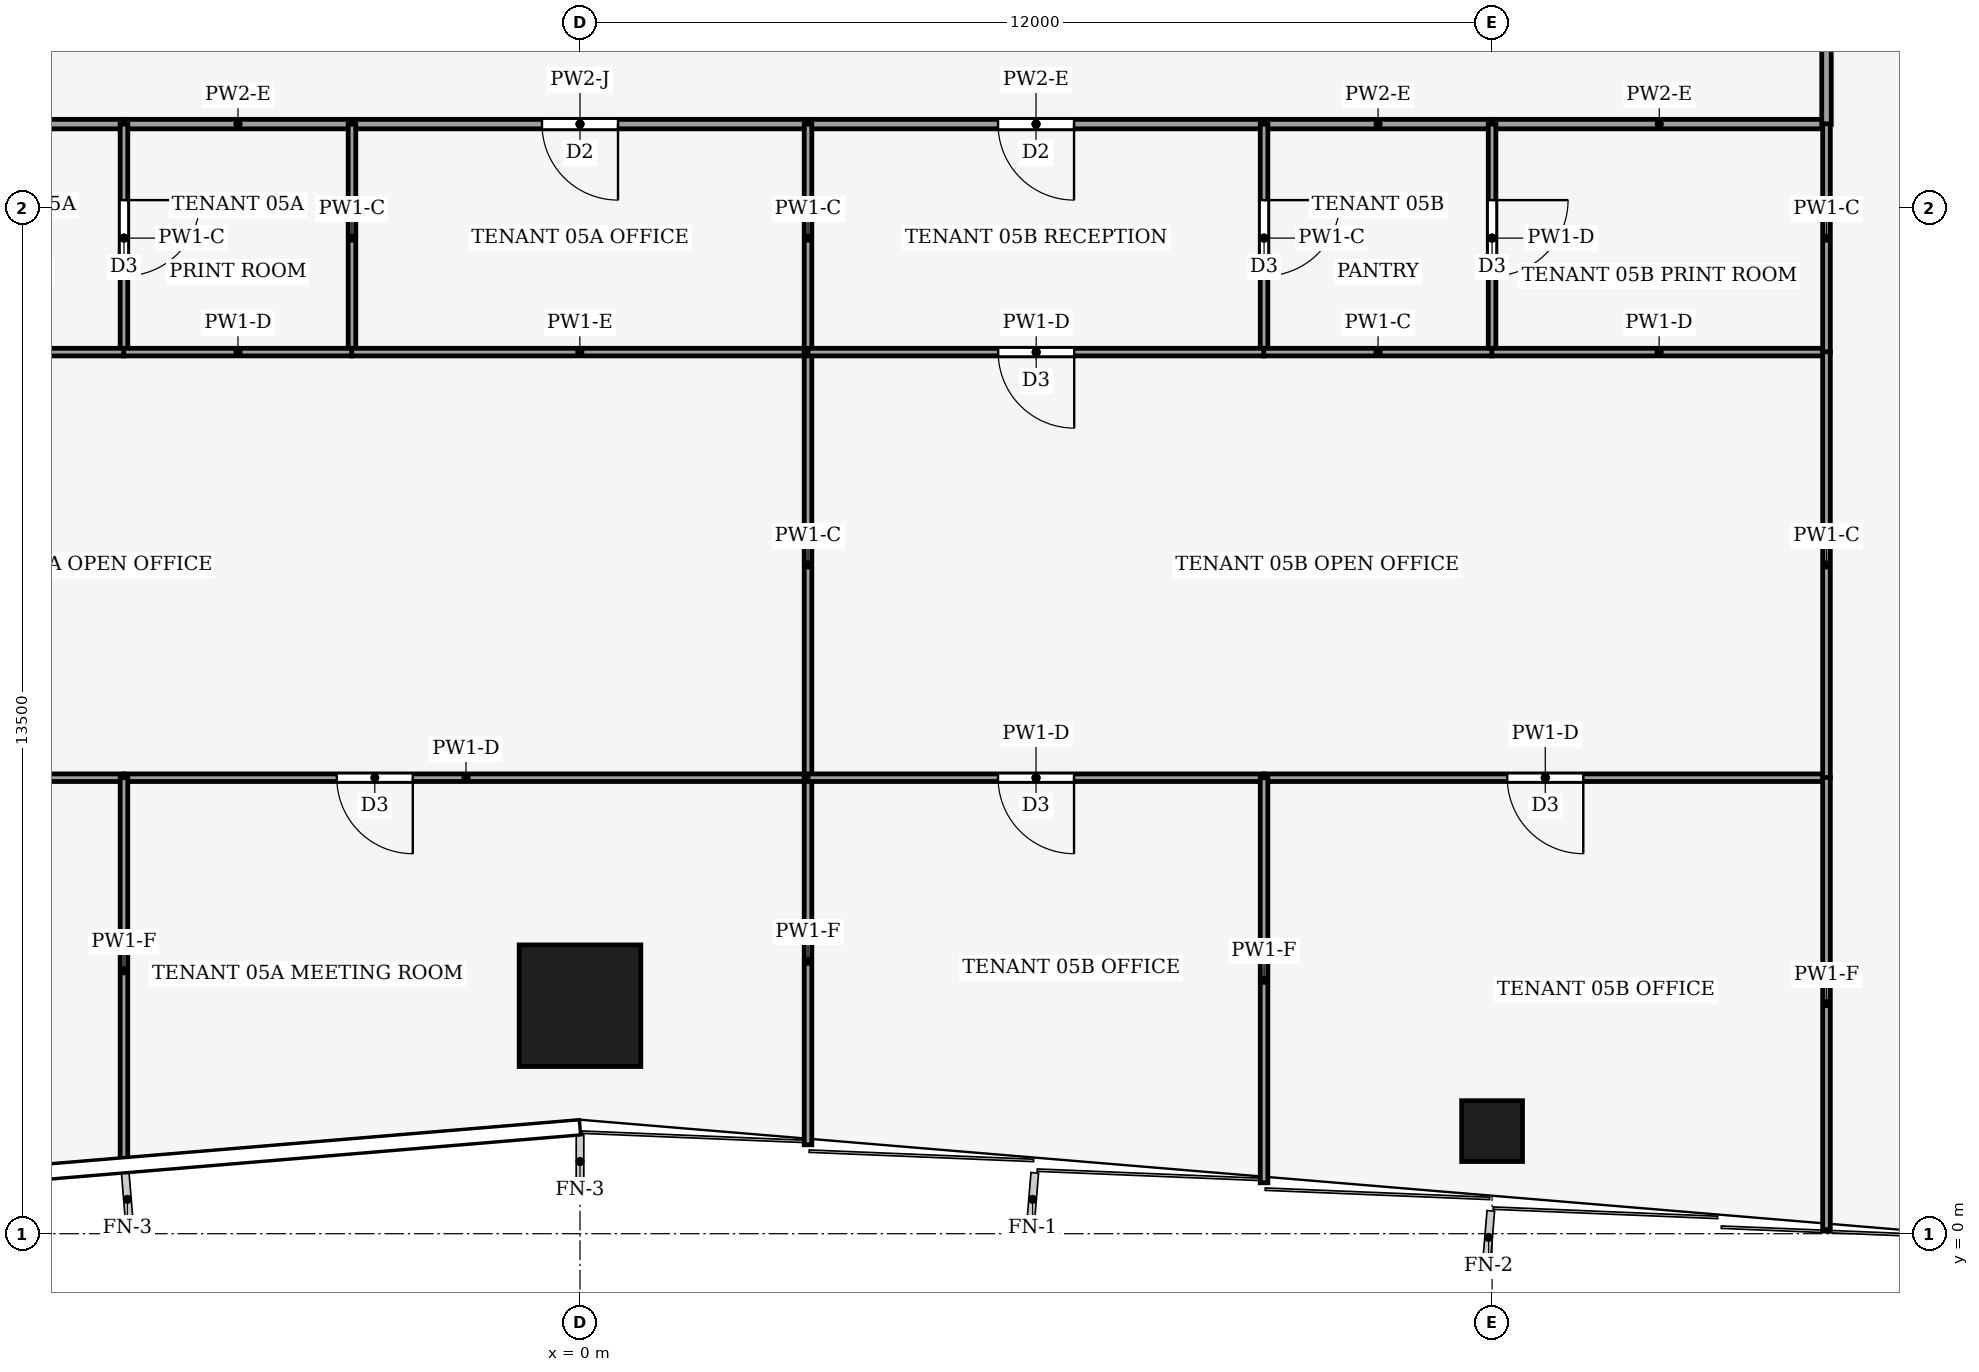
"""IFC4 building model, lengths in metres.
Left out: names, types, materials, properties, quantities, classifications, styles, units other than length and angle.
Written with IfcOpenShell. Run it as: python <this file> out.ifc"""

import sys

from ifc_helpers import new_model, si_unit, direction, frame, frame_2d, origin, origin_2d, place, context, subcontext, project, spatial, rectangle, hollow_rectangle, extrude, element, fill, save


model = new_model("IFC4")
c1 = context("Model", 3, precision=1e-05, world=origin(), true_north=direction((0.0, 1.0)))
c2 = subcontext(c1, "Body", "Model", "MODEL_VIEW")
j1 = project(units=[si_unit("LENGTHUNIT", "METRE"), si_unit("PLANEANGLEUNIT", "RADIAN")], contexts=[c1])
p1 = place(None, origin())
s1 = spatial("IfcSite", under=j1, at=p1, CompositionType="ELEMENT")
p2 = place(p1, origin())
s2 = spatial("IfcBuilding", under=s1, at=p2, CompositionType="ELEMENT")
p3 = place(p2, frame((0.0, 0.0, 26.0)))
s3 = spatial("IfcBuildingStorey", under=s2, at=p3, CompositionType="ELEMENT", Elevation=26.0)
p4 = place(p3, frame((0.0, 3.0, 0.0), z_axis=(0.0, 0.0, 1.0), x_axis=(1.0, 0.0, 0.0)))
e1 = element("IfcColumn", 1, at=p4, inside=s3, PredefinedType="COLUMN", context=c2, shape_type="SweptSolid", body=[
    extrude(hollow_rectangle(XDim=1.6, YDim=1.6, WallThickness=0.09, at=origin_2d()), origin(), (0.0, 0.0, 1.0), 4.0),
])
p5 = place(p3, frame((12.0, 1.35, 0.0), z_axis=(0.0, 0.0, 1.0), x_axis=(1.0, 0.0, 0.0)))
e2 = element("IfcColumn", 2, at=p5, inside=s3, PredefinedType="COLUMN", context=c2, shape_type="SweptSolid", body=[
    extrude(hollow_rectangle(XDim=0.8, YDim=0.8, WallThickness=0.04, at=origin_2d()), origin(), (0.0, 0.0, 1.0), 4.0),
])
for number, where, z_axis, x_axis in (
    (3, (-9.0, 14.6, 0.0), (0.0, 0.0, 1.0), (1.0, 0.0, 0.0)),
    (4, (-6.0, 14.6, 0.0), (0.0, 0.0, 1.0), (1.0, 0.0, 0.0)),
):
    element("IfcWall", number, at=place(p3, frame(where, z_axis=z_axis, x_axis=x_axis)), inside=s3, PredefinedType="PARTITIONING", context=c2, shape_type="SweptSolid", body=[
        extrude(rectangle(XDim=3.0, YDim=0.125, at=frame_2d((1.5, 0.0))), origin(), (0.0, 0.0, 1.0), 3.29),
    ])
p6 = place(p3, frame((3.0, 14.6, 0.0), z_axis=(0.0, 0.0, 1.0), x_axis=(-1.0, 0.0, 0.0)))
e5 = element("IfcWall", 5, at=p6, inside=s3, PredefinedType="PARTITIONING", context=c2, shape_type="SweptSolid", body=[
    extrude(rectangle(XDim=6.0, YDim=0.125, at=frame_2d((3.0, 0.0))), origin(), (0.0, 0.0, 1.0), 3.34),
])
p7 = place(p6, frame((2.5, 0.0, 0.0)))
e6 = element("IfcOpeningElement", 6, at=p7, cuts=e5, PredefinedType="OPENING", context=c2, shape_type="SweptSolid", body=[
    extrude(rectangle(XDim=1.0, YDim=2.1, at=frame_2d((0.5, 1.05))), frame((0.0, 0.073, 0.0), z_axis=(0.0, -1.0, 0.0), x_axis=(1.0, 0.0, 0.0)), (0.0, 0.0, 1.0), 0.145),
])
p8 = place(p3, frame((9.0, 14.6, 0.0), z_axis=(0.0, 0.0, 1.0), x_axis=(-1.0, 0.0, 0.0)))
e7 = element("IfcWall", 7, at=p8, inside=s3, PredefinedType="PARTITIONING", context=c2, shape_type="SweptSolid", body=[
    extrude(rectangle(XDim=6.0, YDim=0.125, at=frame_2d((3.0, 0.0))), origin(), (0.0, 0.0, 1.0), 3.29),
])
p9 = place(p8, frame((2.5, 0.0, 0.0)))
e8 = element("IfcOpeningElement", 8, at=p9, cuts=e7, PredefinedType="OPENING", context=c2, shape_type="SweptSolid", body=[
    extrude(rectangle(XDim=1.0, YDim=2.1, at=frame_2d((0.5, 1.05))), frame((0.0, 0.073, 0.0), z_axis=(0.0, -1.0, 0.0), x_axis=(1.0, 0.0, 0.0)), (0.0, 0.0, 1.0), 0.145),
])
p10 = place(p3, frame((9.0, 14.6, 0.0), z_axis=(0.0, 0.0, 1.0), x_axis=(1.0, 0.0, 0.0)))
e9 = element("IfcWall", 9, at=p10, inside=s3, PredefinedType="PARTITIONING", context=c2, shape_type="SweptSolid", body=[
    extrude(rectangle(XDim=3.0, YDim=0.125, at=frame_2d((1.5, 0.0))), origin(), (0.0, 0.0, 1.0), 3.29),
])
p11 = place(p3, frame((12.0, 14.6, 0.0), z_axis=(0.0, 0.0, 1.0), x_axis=(1.0, 0.0, 0.0)))
e10 = element("IfcWall", 10, at=p11, inside=s3, PredefinedType="PARTITIONING", context=c2, shape_type="SweptSolid", body=[
    extrude(rectangle(XDim=4.4, YDim=0.125, at=frame_2d((2.2, 0.0))), origin(), (0.0, 0.0, 1.0), 3.29),
])
p12 = place(p3, frame((16.4, 18.0, 0.0), z_axis=(0.0, 0.0, 1.0), x_axis=(0.0, -1.0, 0.0)))
e11 = element("IfcWall", 11, at=p12, inside=s3, PredefinedType="PARTITIONING", context=c2, shape_type="SweptSolid", body=[
    extrude(rectangle(XDim=3.404, YDim=0.125, at=frame_2d((1.702, 0.0))), origin(), (0.0, 0.0, 1.0), 3.14),
])
p13 = place(p12, frame((1.202, 0.0, 0.0)))
e12 = element("IfcOpeningElement", 12, at=p13, cuts=e11, PredefinedType="OPENING", context=c2, shape_type="SweptSolid", body=[
    extrude(rectangle(XDim=1.0, YDim=2.1, at=frame_2d((0.5, 1.05))), frame((0.0, 0.073, 0.0), z_axis=(0.0, -1.0, 0.0), x_axis=(1.0, 0.0, 0.0)), (0.0, 0.0, 1.0), 0.145),
])
p14 = place(p3, frame((-6.0, 14.6, 0.0), z_axis=(0.0, 0.0, 1.0), x_axis=(0.0, -1.0, 0.0)))
e13 = element("IfcWall", 13, at=p14, inside=s3, PredefinedType="PARTITIONING", context=c2, shape_type="SweptSolid", body=[
    extrude(rectangle(XDim=3.0, YDim=0.1, at=frame_2d((1.5, 0.0))), origin(), (0.0, 0.0, 1.0), 3.87),
])
p15 = place(p14, frame((1.0, 0.0, 0.0)))
e14 = element("IfcOpeningElement", 14, at=p15, cuts=e13, PredefinedType="OPENING", context=c2, shape_type="SweptSolid", body=[
    extrude(rectangle(XDim=1.0, YDim=2.1, at=frame_2d((0.5, 1.05))), frame((0.0, 0.06, 0.0), z_axis=(0.0, -1.0, 0.0), x_axis=(1.0, 0.0, 0.0)), (0.0, 0.0, 1.0), 0.12),
])
p16 = place(p3, frame((-9.004, 11.6, 0.0), z_axis=(0.0, 0.0, 1.0), x_axis=(1.0, 0.0, 0.0)))
e15 = element("IfcWall", 15, at=p16, inside=s3, PredefinedType="PARTITIONING", context=c2, shape_type="SweptSolid", body=[
    extrude(rectangle(XDim=3.008, YDim=0.1, at=frame_2d((1.504, 0.0))), origin(), (0.0, 0.0, 1.0), 3.29),
])
p17 = place(p3, frame((-3.0, 11.6, 0.0), z_axis=(0.0, 0.0, 1.0), x_axis=(0.0, 1.0, 0.0)))
e16 = element("IfcWall", 16, at=p17, inside=s3, PredefinedType="PARTITIONING", context=c2, shape_type="SweptSolid", body=[
    extrude(rectangle(XDim=3.0, YDim=0.1, at=frame_2d((1.5, 0.0))), origin(), (0.0, 0.0, 1.0), 3.87),
])
p18 = place(p3, frame((-6.004, 11.6, 0.0), z_axis=(0.0, 0.0, 1.0), x_axis=(1.0, 0.0, 0.0)))
e17 = element("IfcWall", 17, at=p18, inside=s3, PredefinedType="PARTITIONING", context=c2, shape_type="SweptSolid", body=[
    extrude(rectangle(XDim=3.008, YDim=0.1, at=frame_2d((1.504, 0.0))), origin(), (0.0, 0.0, 1.0), 3.29),
])
p19 = place(p3, frame((-3.004, 11.6, 0.0), z_axis=(0.0, 0.0, 1.0), x_axis=(1.0, 0.0, 0.0)))
e18 = element("IfcWall", 18, at=p19, inside=s3, PredefinedType="PARTITIONING", context=c2, shape_type="SweptSolid", body=[
    extrude(rectangle(XDim=6.004, YDim=0.1, at=frame_2d((3.002, 0.0))), origin(), (0.0, 0.0, 1.0), 3.34),
])
p20 = place(p3, frame((3.0, 11.6, 0.0), z_axis=(0.0, 0.0, 1.0), x_axis=(0.0, 1.0, 0.0)))
e19 = element("IfcWall", 19, at=p20, inside=s3, PredefinedType="PARTITIONING", context=c2, shape_type="SweptSolid", body=[
    extrude(rectangle(XDim=3.0, YDim=0.1, at=frame_2d((1.5, 0.0))), origin(), (0.0, 0.0, 1.0), 3.87),
])
p21 = place(p3, frame((-6.0, 6.0, 0.0), z_axis=(0.0, 0.0, 1.0), x_axis=(-1.0, 0.0, 0.0)))
e20 = element("IfcWall", 20, at=p21, inside=s3, PredefinedType="PARTITIONING", context=c2, shape_type="SweptSolid", body=[
    extrude(rectangle(XDim=10.4, YDim=0.1, at=frame_2d((5.2, 0.0))), origin(), (0.0, 0.0, 1.0), 3.29),
])
p22 = place(p21, frame((4.7, 0.0, 0.0)))
e21 = element("IfcOpeningElement", 21, at=p22, cuts=e20, PredefinedType="OPENING", context=c2, shape_type="SweptSolid", body=[
    extrude(rectangle(XDim=1.0, YDim=2.1, at=frame_2d((0.5, 1.05))), frame((0.0, 0.06, 0.0), z_axis=(0.0, -1.0, 0.0), x_axis=(1.0, 0.0, 0.0)), (0.0, 0.0, 1.0), 0.12),
])
p23 = place(p3, frame((3.0, 6.0, 0.0), z_axis=(0.0, 0.0, 1.0), x_axis=(-1.0, 0.0, 0.0)))
e22 = element("IfcWall", 22, at=p23, inside=s3, PredefinedType="PARTITIONING", context=c2, shape_type="SweptSolid", body=[
    extrude(rectangle(XDim=9.0, YDim=0.1, at=frame_2d((4.5, 0.0))), origin(), (0.0, 0.0, 1.0), 3.29),
])
p24 = place(p23, frame((5.2, 0.0, 0.0)))
e23 = element("IfcOpeningElement", 23, at=p24, cuts=e22, PredefinedType="OPENING", context=c2, shape_type="SweptSolid", body=[
    extrude(rectangle(XDim=1.0, YDim=2.1, at=frame_2d((0.5, 1.05))), frame((0.0, 0.06, 0.0), z_axis=(0.0, -1.0, 0.0), x_axis=(1.0, 0.0, 0.0)), (0.0, 0.0, 1.0), 0.12),
])
p25 = place(p3, frame((3.0, 6.0, 0.0), z_axis=(0.0, 0.0, 1.0), x_axis=(0.0, 1.0, 0.0)))
e24 = element("IfcWall", 24, at=p25, inside=s3, PredefinedType="PARTITIONING", context=c2, shape_type="SweptSolid", body=[
    extrude(rectangle(XDim=5.6, YDim=0.1, at=frame_2d((2.8, 0.0))), origin(), (0.0, 0.0, 1.0), 3.87),
])
p26 = place(p3, frame((-6.0, 0.92, 0.0), z_axis=(0.0, 0.0, 1.0), x_axis=(0.0, 1.0, 0.0)))
e25 = element("IfcWall", 25, at=p26, inside=s3, PredefinedType="PARTITIONING", context=c2, shape_type="SweptSolid", body=[
    extrude(rectangle(XDim=5.08, YDim=0.1, at=frame_2d((2.54, 0.0))), origin(), (0.0, 0.0, 1.0), 3.04),
])
p27 = place(p3, frame((3.0, 1.17, 0.0), z_axis=(0.0, 0.0, 1.0), x_axis=(0.0, 1.0, 0.0)))
e26 = element("IfcWall", 26, at=p27, inside=s3, PredefinedType="PARTITIONING", context=c2, shape_type="SweptSolid", body=[
    extrude(rectangle(XDim=4.83, YDim=0.1, at=frame_2d((2.415, 0.0))), origin(), (0.0, 0.0, 1.0), 3.04),
])
p28 = place(p3, frame((9.0, 14.6, 0.0), z_axis=(0.0, 0.0, 1.0), x_axis=(0.0, -1.0, 0.0)))
e27 = element("IfcWall", 27, at=p28, inside=s3, PredefinedType="PARTITIONING", context=c2, shape_type="SweptSolid", body=[
    extrude(rectangle(XDim=3.0, YDim=0.1, at=frame_2d((1.5, 0.0))), origin(), (0.0, 0.0, 1.0), 3.87),
])
p29 = place(p28, frame((1.0, 0.0, 0.0)))
e28 = element("IfcOpeningElement", 28, at=p29, cuts=e27, PredefinedType="OPENING", context=c2, shape_type="SweptSolid", body=[
    extrude(rectangle(XDim=1.0, YDim=2.1, at=frame_2d((0.5, 1.05))), frame((0.0, 0.06, 0.0), z_axis=(0.0, -1.0, 0.0), x_axis=(1.0, 0.0, 0.0)), (0.0, 0.0, 1.0), 0.12),
])
p30 = place(p3, frame((9.004, 11.6, 0.0), z_axis=(0.0, 0.0, 1.0), x_axis=(-1.0, 0.0, 0.0)))
e29 = element("IfcWall", 29, at=p30, inside=s3, PredefinedType="PARTITIONING", context=c2, shape_type="SweptSolid", body=[
    extrude(rectangle(XDim=6.004, YDim=0.1, at=frame_2d((3.002, 0.0))), origin(), (0.0, 0.0, 1.0), 3.29),
])
p31 = place(p30, frame((2.502, 0.0, 0.0)))
e30 = element("IfcOpeningElement", 30, at=p31, cuts=e29, PredefinedType="OPENING", context=c2, shape_type="SweptSolid", body=[
    extrude(rectangle(XDim=1.0, YDim=2.1, at=frame_2d((0.5, 1.05))), frame((0.0, 0.06, 0.0), z_axis=(0.0, -1.0, 0.0), x_axis=(1.0, 0.0, 0.0)), (0.0, 0.0, 1.0), 0.12),
])
p32 = place(p3, frame((12.0, 14.6, 0.0), z_axis=(0.0, 0.0, 1.0), x_axis=(0.0, -1.0, 0.0)))
e31 = element("IfcWall", 31, at=p32, inside=s3, PredefinedType="PARTITIONING", context=c2, shape_type="SweptSolid", body=[
    extrude(rectangle(XDim=3.0, YDim=0.1, at=frame_2d((1.5, 0.0))), origin(), (0.0, 0.0, 1.0), 3.29),
])
p33 = place(p32, frame((1.0, 0.0, 0.0)))
e32 = element("IfcOpeningElement", 32, at=p33, cuts=e31, PredefinedType="OPENING", context=c2, shape_type="SweptSolid", body=[
    extrude(rectangle(XDim=1.0, YDim=2.1, at=frame_2d((0.5, 1.05))), frame((0.0, 0.06, 0.0), z_axis=(0.0, -1.0, 0.0), x_axis=(1.0, 0.0, 0.0)), (0.0, 0.0, 1.0), 0.12),
])
p34 = place(p3, frame((8.996, 11.6, 0.0), z_axis=(0.0, 0.0, 1.0), x_axis=(1.0, 0.0, 0.0)))
e33 = element("IfcWall", 33, at=p34, inside=s3, PredefinedType="PARTITIONING", context=c2, shape_type="SweptSolid", body=[
    extrude(rectangle(XDim=3.008, YDim=0.1, at=frame_2d((1.504, 0.0))), origin(), (0.0, 0.0, 1.0), 3.87),
])
p35 = place(p3, frame((11.996, 11.6, 0.0), z_axis=(0.0, 0.0, 1.0), x_axis=(1.0, 0.0, 0.0)))
e34 = element("IfcWall", 34, at=p35, inside=s3, PredefinedType="PARTITIONING", context=c2, shape_type="SweptSolid", body=[
    extrude(rectangle(XDim=4.404, YDim=0.1, at=frame_2d((2.202, 0.0))), origin(), (0.0, 0.0, 1.0), 3.29),
])
p36 = place(p3, frame((16.4, 11.596, 0.0), z_axis=(0.0, 0.0, 1.0), x_axis=(0.0, 1.0, 0.0)))
e35 = element("IfcWall", 35, at=p36, inside=s3, PredefinedType="PARTITIONING", context=c2, shape_type="SweptSolid", body=[
    extrude(rectangle(XDim=3.008, YDim=0.1, at=frame_2d((1.504, 0.0))), origin(), (0.0, 0.0, 1.0), 3.87),
])
p37 = place(p3, frame((9.0, 6.0, 0.0), z_axis=(0.0, 0.0, 1.0), x_axis=(-1.0, 0.0, 0.0)))
e36 = element("IfcWall", 36, at=p37, inside=s3, PredefinedType="PARTITIONING", context=c2, shape_type="SweptSolid", body=[
    extrude(rectangle(XDim=6.0, YDim=0.1, at=frame_2d((3.0, 0.0))), origin(), (0.0, 0.0, 1.0), 3.29),
])
p38 = place(p37, frame((2.5, 0.0, 0.0)))
e37 = element("IfcOpeningElement", 37, at=p38, cuts=e36, PredefinedType="OPENING", context=c2, shape_type="SweptSolid", body=[
    extrude(rectangle(XDim=1.0, YDim=2.1, at=frame_2d((0.5, 1.05))), frame((0.0, 0.06, 0.0), z_axis=(0.0, -1.0, 0.0), x_axis=(1.0, 0.0, 0.0)), (0.0, 0.0, 1.0), 0.12),
])
p39 = place(p3, frame((16.4, 6.0, 0.0), z_axis=(0.0, 0.0, 1.0), x_axis=(-1.0, 0.0, 0.0)))
e38 = element("IfcWall", 38, at=p39, inside=s3, PredefinedType="PARTITIONING", context=c2, shape_type="SweptSolid", body=[
    extrude(rectangle(XDim=7.4, YDim=0.1, at=frame_2d((3.7, 0.0))), origin(), (0.0, 0.0, 1.0), 3.29),
])
p40 = place(p39, frame((3.2, 0.0, 0.0)))
e39 = element("IfcOpeningElement", 39, at=p40, cuts=e38, PredefinedType="OPENING", context=c2, shape_type="SweptSolid", body=[
    extrude(rectangle(XDim=1.0, YDim=2.1, at=frame_2d((0.5, 1.05))), frame((0.0, 0.06, 0.0), z_axis=(0.0, -1.0, 0.0), x_axis=(1.0, 0.0, 0.0)), (0.0, 0.0, 1.0), 0.12),
])
p41 = place(p3, frame((16.4, 5.996, 0.0), z_axis=(0.0, 0.0, 1.0), x_axis=(0.0, 1.0, 0.0)))
e40 = element("IfcWall", 40, at=p41, inside=s3, PredefinedType="PARTITIONING", context=c2, shape_type="SweptSolid", body=[
    extrude(rectangle(XDim=5.608, YDim=0.1, at=frame_2d((2.804, 0.0))), origin(), (0.0, 0.0, 1.0), 3.87),
])
p42 = place(p3, frame((9.0, 0.67, 0.0), z_axis=(0.0, 0.0, 1.0), x_axis=(0.0, 1.0, 0.0)))
e41 = element("IfcWall", 41, at=p42, inside=s3, PredefinedType="PARTITIONING", context=c2, shape_type="SweptSolid", body=[
    extrude(rectangle(XDim=5.33, YDim=0.1, at=frame_2d((2.665, 0.0))), origin(), (0.0, 0.0, 1.0), 3.04),
])
p43 = place(p3, frame((16.4, 0.053, 0.0), z_axis=(0.0, 0.0, 1.0), x_axis=(0.0, 1.0, 0.0)))
e42 = element("IfcWall", 42, at=p43, inside=s3, PredefinedType="PARTITIONING", context=c2, shape_type="SweptSolid", body=[
    extrude(rectangle(XDim=5.951, YDim=0.1, at=frame_2d((2.975, 0.0))), origin(), (0.0, 0.0, 1.0), 3.04),
])
p44 = place(p7, origin())
e43 = element("IfcDoor", 43, at=p44, inside=s3, OperationType="SINGLE_SWING_RIGHT", PredefinedType="DOOR", context=c2, shape_type="SweptSolid", body=[
    extrude(rectangle(XDim=1.0, YDim=2.1, at=frame_2d((0.5, 1.05))), frame((0.0, 0.025, 0.0), z_axis=(0.0, -1.0, 0.0), x_axis=(1.0, 0.0, 0.0)), (0.0, 0.0, 1.0), 0.05),
])
fill(e6, e43)
p45 = place(p9, origin())
e44 = element("IfcDoor", 44, at=p45, inside=s3, OperationType="SINGLE_SWING_LEFT", PredefinedType="DOOR", context=c2, shape_type="SweptSolid", body=[
    extrude(rectangle(XDim=1.0, YDim=2.1, at=frame_2d((0.5, 1.05))), frame((0.0, 0.025, 0.0), z_axis=(0.0, -1.0, 0.0), x_axis=(1.0, 0.0, 0.0)), (0.0, 0.0, 1.0), 0.05),
])
fill(e8, e44)
p46 = place(p15, origin())
e45 = element("IfcDoor", 45, at=p46, inside=s3, OperationType="SINGLE_SWING_RIGHT", PredefinedType="DOOR", context=c2, shape_type="SweptSolid", body=[
    extrude(rectangle(XDim=1.0, YDim=2.1, at=frame_2d((0.5, 1.05))), frame((0.0, 0.025, 0.0), z_axis=(0.0, -1.0, 0.0), x_axis=(1.0, 0.0, 0.0)), (0.0, 0.0, 1.0), 0.05),
])
fill(e14, e45)
p47 = place(p24, origin())
e46 = element("IfcDoor", 46, at=p47, inside=s3, OperationType="SINGLE_SWING_RIGHT", PredefinedType="DOOR", context=c2, shape_type="SweptSolid", body=[
    extrude(rectangle(XDim=1.0, YDim=2.1, at=frame_2d((0.5, 1.05))), frame((0.0, 0.025, 0.0), z_axis=(0.0, -1.0, 0.0), x_axis=(1.0, 0.0, 0.0)), (0.0, 0.0, 1.0), 0.05),
])
fill(e23, e46)
p48 = place(p29, origin())
e47 = element("IfcDoor", 47, at=p48, inside=s3, OperationType="SINGLE_SWING_LEFT", PredefinedType="DOOR", context=c2, shape_type="SweptSolid", body=[
    extrude(rectangle(XDim=1.0, YDim=2.1, at=frame_2d((0.5, 1.05))), frame((0.0, 0.025, 0.0), z_axis=(0.0, -1.0, 0.0), x_axis=(1.0, 0.0, 0.0)), (0.0, 0.0, 1.0), 0.05),
])
fill(e28, e47)
p49 = place(p31, origin())
e48 = element("IfcDoor", 48, at=p49, inside=s3, OperationType="SINGLE_SWING_RIGHT", PredefinedType="DOOR", context=c2, shape_type="SweptSolid", body=[
    extrude(rectangle(XDim=1.0, YDim=2.1, at=frame_2d((0.5, 1.05))), frame((0.0, 0.025, 0.0), z_axis=(0.0, -1.0, 0.0), x_axis=(1.0, 0.0, 0.0)), (0.0, 0.0, 1.0), 0.05),
])
fill(e30, e48)
p50 = place(p33, origin())
e49 = element("IfcDoor", 49, at=p50, inside=s3, OperationType="SINGLE_SWING_LEFT", PredefinedType="DOOR", context=c2, shape_type="SweptSolid", body=[
    extrude(rectangle(XDim=1.0, YDim=2.1, at=frame_2d((0.5, 1.05))), frame((0.0, 0.025, 0.0), z_axis=(0.0, -1.0, 0.0), x_axis=(1.0, 0.0, 0.0)), (0.0, 0.0, 1.0), 0.05),
])
fill(e32, e49)
p51 = place(p38, origin())
e50 = element("IfcDoor", 50, at=p51, inside=s3, OperationType="SINGLE_SWING_RIGHT", PredefinedType="DOOR", context=c2, shape_type="SweptSolid", body=[
    extrude(rectangle(XDim=1.0, YDim=2.1, at=frame_2d((0.5, 1.05))), frame((0.0, 0.025, 0.0), z_axis=(0.0, -1.0, 0.0), x_axis=(1.0, 0.0, 0.0)), (0.0, 0.0, 1.0), 0.05),
])
fill(e37, e50)
p52 = place(p40, origin())
e51 = element("IfcDoor", 51, at=p52, inside=s3, OperationType="SINGLE_SWING_LEFT", PredefinedType="DOOR", context=c2, shape_type="SweptSolid", body=[
    extrude(rectangle(XDim=1.0, YDim=2.1, at=frame_2d((0.5, 1.05))), frame((0.0, 0.025, 0.0), z_axis=(0.0, -1.0, 0.0), x_axis=(1.0, 0.0, 0.0)), (0.0, 0.0, 1.0), 0.05),
])
fill(e39, e51)
save(model, sys.argv[1])
